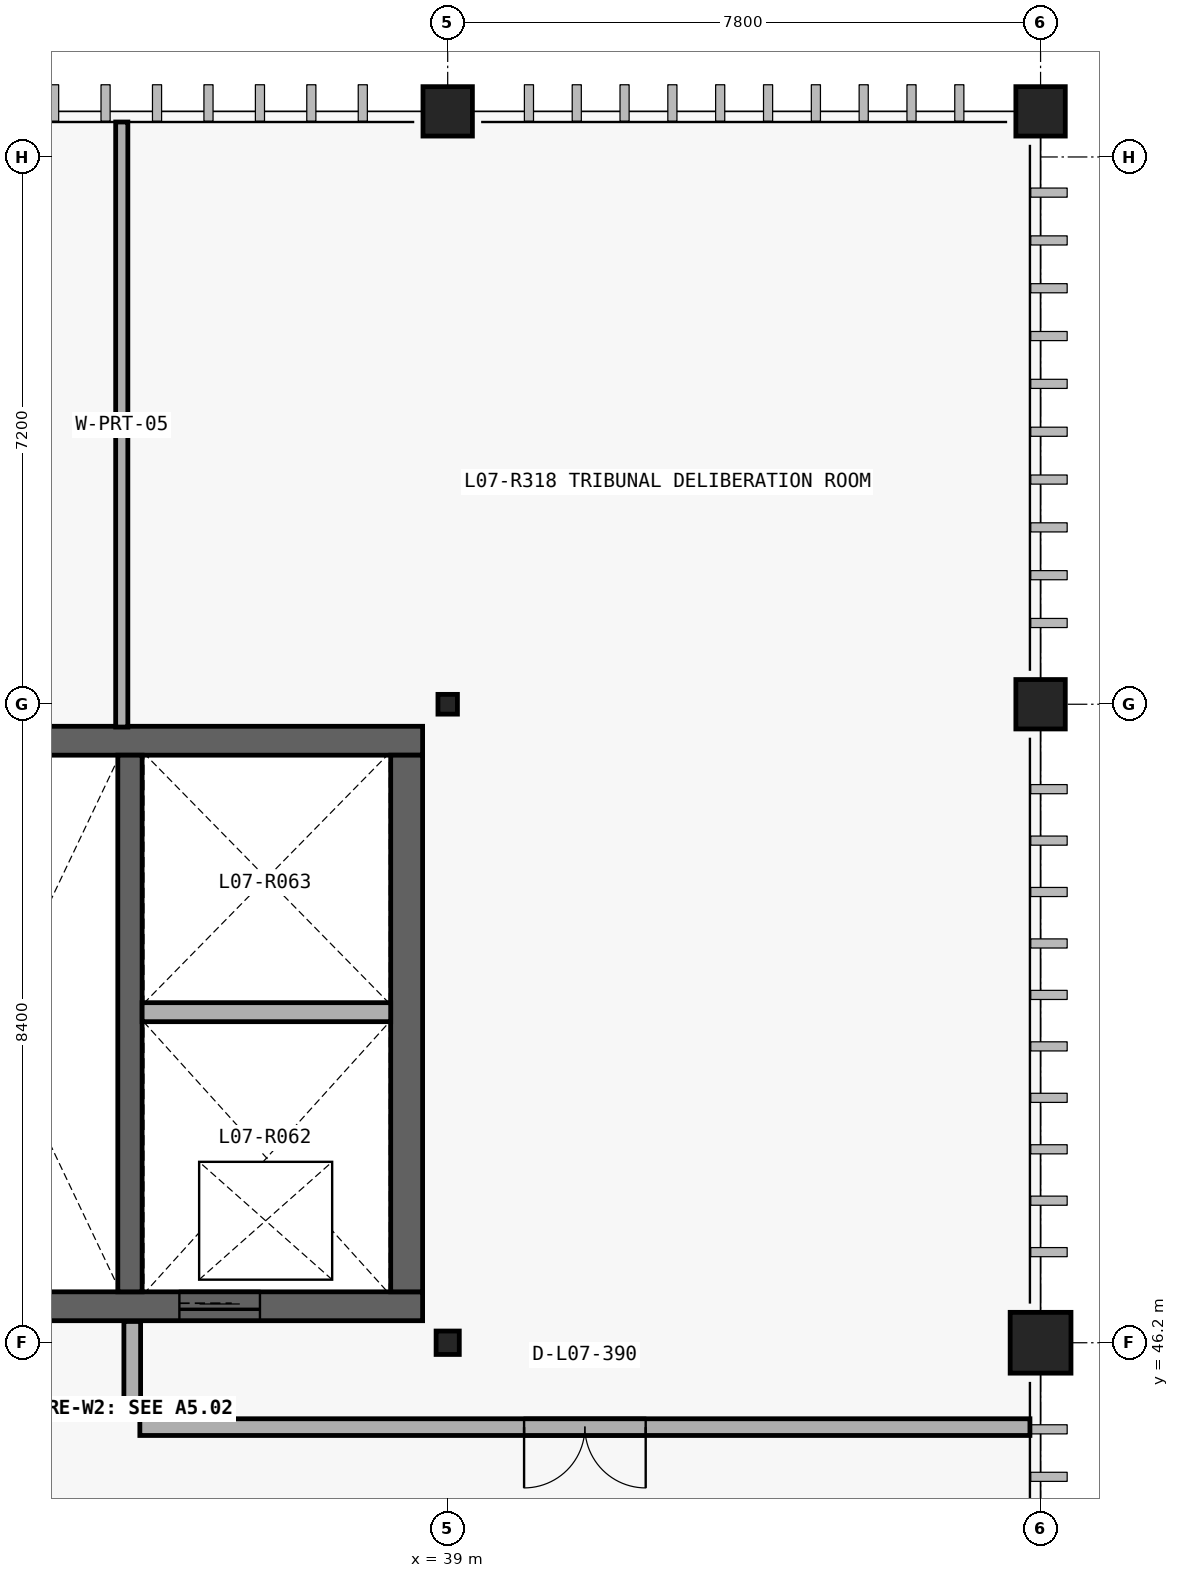
"""IFC4 building model, lengths in metres.
Left out: names, types, materials, properties, quantities, classifications, styles, units other than length and angle.
Written with IfcOpenShell. Run it as: python <this file> out.ifc"""

import sys

from ifc_helpers import new_model, si_unit, direction, frame, frame_2d, origin_with_axes, origin_2d_with_axis, place, context, subcontext, project, spatial, rectangle, circle, i_section, extrude, element, fill, save


model = new_model("IFC4")
c1 = context("Model", 3, precision=1e-05, world=origin_with_axes(), true_north=direction((0.0, 1.0)))
c2 = subcontext(c1, "Body", "Model", "MODEL_VIEW")
j1 = project(units=[si_unit("LENGTHUNIT", "METRE"), si_unit("PLANEANGLEUNIT", "RADIAN")], contexts=[c1])
p1 = place(None, origin_with_axes())
s1 = spatial("IfcSite", under=j1, at=p1, CompositionType="ELEMENT")
p2 = place(p1, origin_with_axes())
s2 = spatial("IfcBuilding", under=s1, at=p2, CompositionType="ELEMENT")
p3 = place(p2, frame((0.0, 0.0, 34.5), z_axis=(0.0, 0.0, 1.0), x_axis=(1.0, 0.0, 0.0)))
s3 = spatial("IfcBuildingStorey", under=s2, at=p3, CompositionType="ELEMENT", Elevation=34.5)
p4 = place(None, frame((30.93, 46.68, 34.5), z_axis=(0.0, 0.0, 1.0), x_axis=(1.0, 0.0, 0.0)))
e1 = element("IfcWall", 1, at=p4, inside=s3, PredefinedType="SHEAR", context=c2, shape_type="SweptSolid", body=[
    extrude(rectangle(XDim=7.74, YDim=0.38, at=frame_2d((3.87, 0.0), x_axis=(1.0, 0.0))), origin_with_axes(), (0.0, 0.0, 1.0), 4.5),
])
p5 = place(None, frame((32.35, 46.68, 34.5), z_axis=(0.0, 0.0, 1.0), x_axis=(1.0, 0.0, 0.0)))
e2 = element("IfcOpeningElement", 2, at=p5, cuts=e1, PredefinedType="OPENING", context=c2, shape_type="SweptSolid", body=[
    extrude(rectangle(XDim=1.14, YDim=2.18, at=frame_2d((0.0, 1.09), x_axis=(1.0, 0.0))), frame((0.0, 0.2, 0.0), z_axis=(0.0, -1.0, 0.0), x_axis=(1.0, 0.0, 0.0)), (0.0, 0.0, 1.0), 0.4),
])
p6 = place(None, frame((36.0, 46.68, 34.5), z_axis=(0.0, 0.0, 1.0), x_axis=(1.0, 0.0, 0.0)))
e3 = element("IfcOpeningElement", 3, at=p6, cuts=e1, PredefinedType="OPENING", context=c2, shape_type="SweptSolid", body=[
    extrude(rectangle(XDim=1.06, YDim=2.16, at=frame_2d((0.0, 1.08), x_axis=(1.0, 0.0))), frame((0.0, 0.2, 0.0), z_axis=(0.0, -1.0, 0.0), x_axis=(1.0, 0.0, 0.0)), (0.0, 0.0, 1.0), 0.4),
])
p7 = place(None, frame((38.67, 54.12, 34.5), z_axis=(0.0, 0.0, 1.0), x_axis=(-1.0, 0.0, 0.0)))
e4 = element("IfcWall", 4, at=p7, inside=s3, PredefinedType="SHEAR", context=c2, shape_type="SweptSolid", body=[
    extrude(rectangle(XDim=7.74, YDim=0.38, at=frame_2d((3.87, 0.0), x_axis=(1.0, 0.0))), origin_with_axes(), (0.0, 0.0, 1.0), 4.5),
])
p8 = place(None, frame((38.46, 46.87, 34.5), z_axis=(0.0, 0.0, 1.0), x_axis=(0.0, 1.0, 0.0)))
e5 = element("IfcWall", 5, at=p8, inside=s3, PredefinedType="SHEAR", context=c2, shape_type="SweptSolid", body=[
    extrude(rectangle(XDim=7.06, YDim=0.42, at=frame_2d((3.53, 0.0), x_axis=(1.0, 0.0))), origin_with_axes(), (0.0, 0.0, 1.0), 4.5),
])
p9 = place(None, frame((34.82, 46.87, 34.5), z_axis=(0.0, 0.0, 1.0), x_axis=(0.0, 1.0, 0.0)))
e6 = element("IfcWall", 6, at=p9, inside=s3, PredefinedType="SHEAR", context=c2, shape_type="SweptSolid", body=[
    extrude(rectangle(XDim=7.06, YDim=0.32, at=frame_2d((3.53, 0.0), x_axis=(1.0, 0.0))), origin_with_axes(), (0.0, 0.0, 1.0), 4.5),
])
p10 = place(None, frame((34.98, 50.549, 34.5), z_axis=(0.0, 0.0, 1.0), x_axis=(1.0, 0.0, 0.0)))
e7 = element("IfcWall", 7, at=p10, inside=s3, PredefinedType="PARTITIONING", context=c2, shape_type="SweptSolid", body=[
    extrude(rectangle(XDim=3.27, YDim=0.25, at=frame_2d((1.635, 0.0), x_axis=(1.0, 0.0))), origin_with_axes(), (0.0, 0.0, 1.0), 4.14),
])
p11 = place(None, frame((34.85, 45.22, 34.5), z_axis=(0.0, 0.0, 1.0), x_axis=(0.0, 1.0, 0.0)))
e8 = element("IfcWall", 8, at=p11, inside=s3, PredefinedType="PARTITIONING", context=c2, shape_type="SweptSolid", body=[
    extrude(rectangle(XDim=1.26, YDim=0.22, at=frame_2d((0.63, 0.0), x_axis=(1.0, 0.0))), origin_with_axes(), (0.0, 0.0, 1.0), 4.14),
])
p12 = place(None, frame((34.95, 45.09, 34.5), z_axis=(0.0, 0.0, 1.0), x_axis=(1.0, 0.0, 0.0)))
e9 = element("IfcWall", 9, at=p12, inside=s3, PredefinedType="PARTITIONING", context=c2, shape_type="SweptSolid", body=[
    extrude(rectangle(XDim=11.71, YDim=0.22, at=frame_2d((5.855, 0.0), x_axis=(1.0, 0.0))), origin_with_axes(), (0.0, 0.0, 1.0), 4.14),
])
p13 = place(None, frame((40.805, 45.09, 34.5), z_axis=(0.0, 0.0, 1.0), x_axis=(1.0, 0.0, 0.0)))
e10 = element("IfcOpeningElement", 10, at=p13, cuts=e9, PredefinedType="OPENING", context=c2, shape_type="SweptSolid", body=[
    extrude(rectangle(XDim=1.6, YDim=2.32, at=frame_2d((0.0, 1.16), x_axis=(1.0, 0.0))), frame((0.0, 0.12, 0.0), z_axis=(0.0, -1.0, 0.0), x_axis=(1.0, 0.0, 0.0)), (0.0, 0.0, 1.0), 0.24),
])
p14 = place(None, frame((34.712, 54.3, 34.5), z_axis=(0.0, 0.0, 1.0), x_axis=(0.0, 1.0, 0.0)))
e11 = element("IfcWall", 11, at=p14, inside=s3, PredefinedType="PARTITIONING", context=c2, shape_type="SweptSolid", body=[
    extrude(rectangle(XDim=7.96, YDim=0.16, at=frame_2d((3.98, 0.0), x_axis=(1.0, 0.0))), origin_with_axes(), (0.0, 0.0, 1.0), 4.14),
])
p15 = place(None, frame((39.0, 46.2, 34.5), z_axis=(0.0, 0.0, 1.0), x_axis=(1.0, 0.0, 0.0)))
e12 = element("IfcColumn", 12, at=p15, inside=s3, PredefinedType="COLUMN", context=c2, shape_type="SweptSolid", body=[
    extrude(i_section(OverallWidth=0.305, OverallDepth=0.308, WebThickness=0.01, FlangeThickness=0.015, at=origin_2d_with_axis()), origin_with_axes(), (0.0, 0.0, 1.0), 4.5),
])
p16 = place(None, frame((39.0, 54.6, 34.5), z_axis=(0.0, 0.0, 1.0), x_axis=(1.0, 0.0, 0.0)))
e13 = element("IfcColumn", 13, at=p16, inside=s3, PredefinedType="COLUMN", context=c2, shape_type="SweptSolid", body=[
    extrude(i_section(OverallWidth=0.256, OverallDepth=0.26, WebThickness=0.011, FlangeThickness=0.017, at=origin_2d_with_axis()), origin_with_axes(), (0.0, 0.0, 1.0), 4.5),
])
p17 = place(None, frame((39.0, 62.4, 34.5), z_axis=(0.0, 0.0, 1.0), x_axis=(1.0, 0.0, 0.0)))
e14 = element("IfcColumn", 14, at=p17, inside=s3, PredefinedType="COLUMN", context=c2, shape_type="SweptSolid", body=[
    extrude(circle(Radius=0.325, at=origin_2d_with_axis()), origin_with_axes(), (0.0, 0.0, 1.0), 4.5),
])
p18 = place(None, frame((46.8, 46.2, 34.5), z_axis=(0.0, 0.0, 1.0), x_axis=(1.0, 0.0, 0.0)))
e15 = element("IfcColumn", 15, at=p18, inside=s3, PredefinedType="COLUMN", context=c2, shape_type="SweptSolid", body=[
    extrude(circle(Radius=0.4, at=origin_2d_with_axis()), origin_with_axes(), (0.0, 0.0, 1.0), 4.5),
])
for number, where, z_axis, x_axis in (
    (16, (46.8, 54.6, 34.5), (0.0, 0.0, 1.0), (1.0, 0.0, 0.0)),
    (17, (46.8, 62.4, 34.5), (0.0, 0.0, 1.0), (1.0, 0.0, 0.0)),
):
    element("IfcColumn", number, at=place(None, frame(where, z_axis=z_axis, x_axis=x_axis)), inside=s3, PredefinedType="COLUMN", context=c2, shape_type="SweptSolid", body=[
        extrude(circle(Radius=0.325, at=origin_2d_with_axis()), origin_with_axes(), (0.0, 0.0, 1.0), 4.5),
    ])
p19 = place(None, frame((36.0, 46.68, 34.5), z_axis=(0.0, 0.0, 1.0), x_axis=(-1.0, 0.0, 0.0)))
e18 = element("IfcDoor", 18, at=p19, inside=s3, OperationType="SLIDING_TO_LEFT", PredefinedType="DOOR", context=c2, shape_type="SweptSolid", body=[
    extrude(rectangle(XDim=1.06, YDim=2.16, at=frame_2d((0.0, 1.08), x_axis=(1.0, 0.0))), frame((0.0, 0.04, 0.0), z_axis=(0.0, -1.0, 0.0), x_axis=(1.0, 0.0, 0.0)), (0.0, 0.0, 1.0), 0.08),
])
fill(e3, e18)
p20 = place(None, frame((40.805, 45.09, 34.5), z_axis=(0.0, 0.0, 1.0), x_axis=(-1.0, 0.0, 0.0)))
e19 = element("IfcDoor", 19, at=p20, inside=s3, OperationType="DOUBLE_DOOR_SINGLE_SWING", PredefinedType="DOOR", context=c2, shape_type="SweptSolid", body=[
    extrude(rectangle(XDim=1.6, YDim=2.32, at=frame_2d((0.0, 1.16), x_axis=(1.0, 0.0))), frame((0.0, 0.04, 0.0), z_axis=(0.0, -1.0, 0.0), x_axis=(1.0, 0.0, 0.0)), (0.0, 0.0, 1.0), 0.08),
])
fill(e10, e19)
save(model, sys.argv[1])
